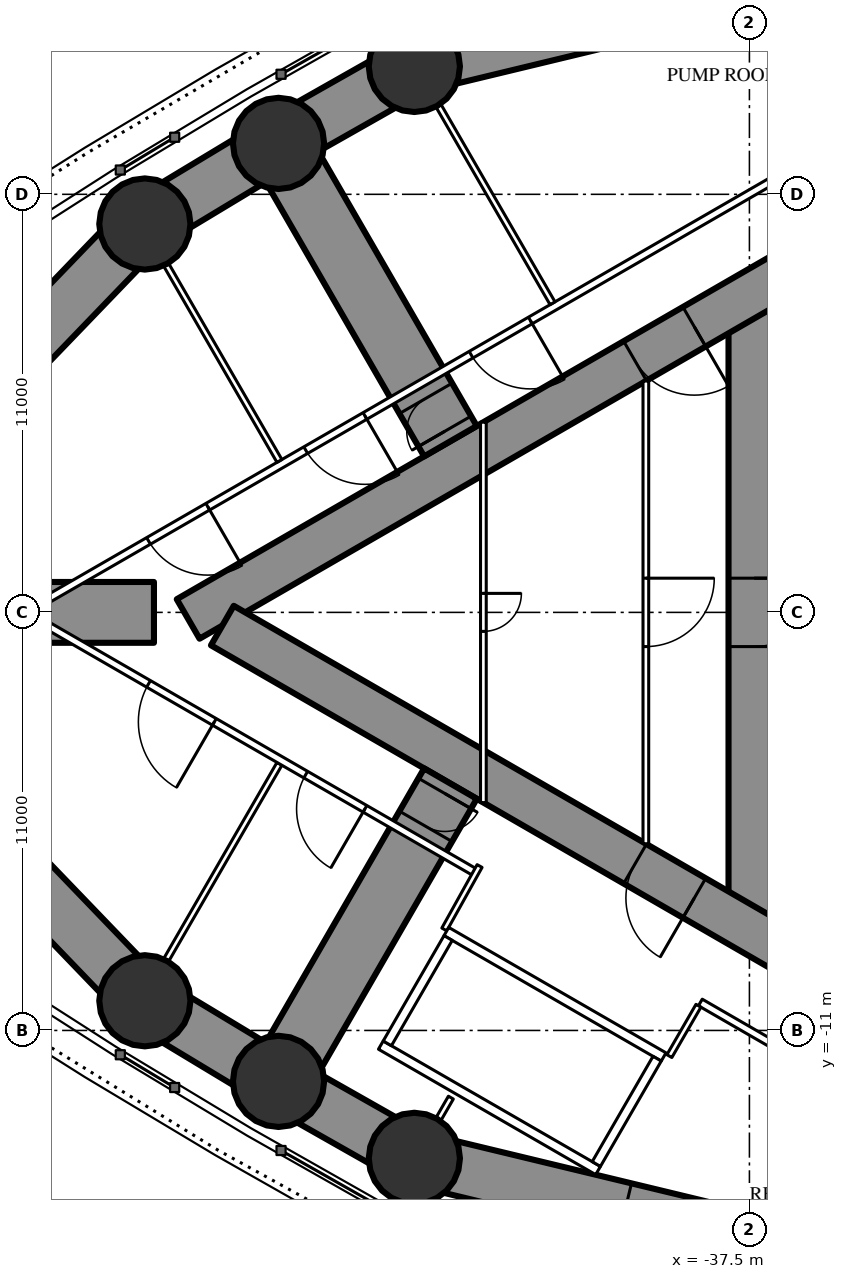
"""IFC4 building model, lengths in metres.
Left out: names, types, materials, properties, quantities, classifications, styles, units other than length and angle.
Written with IfcOpenShell. Run it as: python <this file> out.ifc"""

import sys

from ifc_helpers import new_model, si_unit, direction, frame, frame_2d, origin, origin_2d, place, context, subcontext, project, spatial, rectangle, circle, extrude, element, fill, save


model = new_model("IFC4")
c1 = context("Model", 3, precision=1e-05, world=origin(), true_north=direction((0.0, 1.0)))
c2 = subcontext(c1, "Body", "Model", "MODEL_VIEW")
j1 = project(units=[si_unit("LENGTHUNIT", "METRE"), si_unit("PLANEANGLEUNIT", "RADIAN")], contexts=[c1])
p1 = place(None, origin())
s1 = spatial("IfcSite", under=j1, at=p1, CompositionType="ELEMENT")
p2 = place(p1, origin())
s2 = spatial("IfcBuilding", under=s1, at=p2, CompositionType="ELEMENT")
p3 = place(p2, frame((0.0, 0.0, 210.3)))
s3 = spatial("IfcBuildingStorey", under=s2, at=p3, CompositionType="ELEMENT", Elevation=210.3)
for number, where, z_axis, x_axis in (
    (1, (-53.408, -10.219, 0.0), (0.0, 0.0, 1.0), (1.0, 0.0, 0.0)),
    (2, (-49.89, -12.34, 0.0), (0.0, 0.0, 1.0), (1.0, 0.0, 0.0)),
    (3, (-46.317, -14.365, 0.0), (0.0, 0.0, 1.0), (1.0, 0.0, 0.0)),
    (4, (-46.317, 14.365, 0.0), (0.0, 0.0, 1.0), (1.0, 0.0, 0.0)),
    (5, (-49.89, 12.34, 0.0), (0.0, 0.0, 1.0), (1.0, 0.0, 0.0)),
    (6, (-53.408, 10.219, 0.0), (0.0, 0.0, 1.0), (1.0, 0.0, 0.0)),
):
    element("IfcColumn", number, at=place(p3, frame(where, z_axis=z_axis, x_axis=x_axis)), inside=s3, PredefinedType="COLUMN", context=c2, shape_type="SweptSolid", body=[
        extrude(circle(Radius=1.2, at=origin_2d()), origin(), (0.0, 0.0, 1.0), 5.0),
    ])
p4 = place(p3, frame((-37.375, 8.6, 0.0), z_axis=(0.0, 0.0, 1.0), x_axis=(0.0, -1.0, 0.0)))
e7 = element("IfcWall", 7, at=p4, inside=s3, PredefinedType="SHEAR", context=c2, shape_type="SweptSolid", body=[
    extrude(rectangle(XDim=17.2, YDim=1.35, at=frame_2d((8.6, 0.0))), origin(), (0.0, 0.0, 1.0), 5.0),
])
p5 = place(p4, frame((7.7, 0.0, 0.0)))
e8 = element("IfcOpeningElement", 8, at=p5, cuts=e7, PredefinedType="OPENING", context=c2, shape_type="SweptSolid", body=[
    extrude(rectangle(XDim=1.8, YDim=2.2, at=frame_2d((0.9, 1.1))), frame((0.0, 0.685, 0.0), z_axis=(0.0, -1.0, 0.0), x_axis=(1.0, 0.0, 0.0)), (0.0, 0.0, 1.0), 1.37),
])
p6 = place(p3, frame((-27.2, 14.3, 0.0), z_axis=(0.0, 0.0, 1.0), x_axis=(-0.866026593062, -0.499997940104, 0.0)))
e9 = element("IfcWall", 9, at=p6, inside=s3, PredefinedType="SHEAR", context=c2, shape_type="SweptSolid", body=[
    extrude(rectangle(XDim=28.946, YDim=1.2, at=frame_2d((14.473, 0.0))), origin(), (0.0, 0.0, 1.0), 5.0),
])
p7 = place(p6, frame((6.5, 0.0, 0.0)))
e10 = element("IfcOpeningElement", 10, at=p7, cuts=e9, PredefinedType="OPENING", context=c2, shape_type="SweptSolid", body=[
    extrude(rectangle(XDim=1.0, YDim=2.2, at=frame_2d((0.5, 1.1))), frame((0.0, 0.61, 0.0), z_axis=(0.0, -1.0, 0.0), x_axis=(1.0, 0.0, 0.0)), (0.0, 0.0, 1.0), 1.22),
])
p8 = place(p6, frame((13.568, 0.0, 0.0)))
e11 = element("IfcOpeningElement", 11, at=p8, cuts=e9, PredefinedType="OPENING", context=c2, shape_type="SweptSolid", body=[
    extrude(rectangle(XDim=1.8, YDim=2.2, at=frame_2d((0.9, 1.1))), frame((0.0, 0.61, 0.0), z_axis=(0.0, -1.0, 0.0), x_axis=(1.0, 0.0, 0.0)), (0.0, 0.0, 1.0), 1.22),
])
p9 = place(p3, frame((-27.2, -14.3, 0.0), z_axis=(0.0, 0.0, 1.0), x_axis=(-0.866024021859, 0.500002393557, 0.0)))
e12 = element("IfcWall", 12, at=p9, inside=s3, PredefinedType="SHEAR", context=c2, shape_type="SweptSolid", body=[
    extrude(rectangle(XDim=27.907, YDim=1.2, at=frame_2d((13.954, 0.0))), origin(), (0.0, 0.0, 1.0), 5.0),
])
p10 = place(p9, frame((6.5, 0.0, 0.0)))
e13 = element("IfcOpeningElement", 13, at=p10, cuts=e12, PredefinedType="OPENING", context=c2, shape_type="SweptSolid", body=[
    extrude(rectangle(XDim=1.0, YDim=2.2, at=frame_2d((0.5, 1.1))), frame((0.0, 0.61, 0.0), z_axis=(0.0, -1.0, 0.0), x_axis=(1.0, 0.0, 0.0)), (0.0, 0.0, 1.0), 1.22),
])
p11 = place(p9, frame((13.568, 0.0, 0.0)))
e14 = element("IfcOpeningElement", 14, at=p11, cuts=e12, PredefinedType="OPENING", context=c2, shape_type="SweptSolid", body=[
    extrude(rectangle(XDim=1.8, YDim=2.2, at=frame_2d((0.9, 1.1))), frame((0.0, 0.61, 0.0), z_axis=(0.0, -1.0, 0.0), x_axis=(1.0, 0.0, 0.0)), (0.0, 0.0, 1.0), 1.22),
])
p12 = place(p3, frame((-45.366, 4.504, 0.0), z_axis=(0.0, 0.0, 1.0), x_axis=(-0.499998848701, 0.866026068486, 0.0)))
e15 = element("IfcWall", 15, at=p12, inside=s3, PredefinedType="SHEAR", context=c2, shape_type="SweptSolid", body=[
    extrude(rectangle(XDim=9.048, YDim=1.6, at=frame_2d((4.524, 0.0))), origin(), (0.0, 0.0, 1.0), 5.0),
])
p13 = place(p12, frame((0.3, 0.0, 0.0)))
e16 = element("IfcOpeningElement", 16, at=p13, cuts=e15, PredefinedType="OPENING", context=c2, shape_type="SweptSolid", body=[
    extrude(rectangle(XDim=1.0, YDim=2.2, at=frame_2d((0.5, 1.1))), frame((0.0, 0.81, 0.0), z_axis=(0.0, -1.0, 0.0), x_axis=(1.0, 0.0, 0.0)), (0.0, 0.0, 1.0), 1.62),
])
p14 = place(p3, frame((-53.168, 0.0, 0.0), z_axis=(0.0, 0.0, 1.0), x_axis=(-1.0, 0.0, 0.0)))
e17 = element("IfcWall", 17, at=p14, inside=s3, PredefinedType="SHEAR", context=c2, shape_type="SweptSolid", body=[
    extrude(rectangle(XDim=10.066, YDim=1.6, at=frame_2d((5.033, 0.0))), origin(), (0.0, 0.0, 1.0), 5.0),
])
p15 = place(p3, frame((-45.366, -4.504, 0.0), z_axis=(0.0, 0.0, 1.0), x_axis=(-0.499998848701, -0.866026068486, 0.0)))
e18 = element("IfcWall", 18, at=p15, inside=s3, PredefinedType="SHEAR", context=c2, shape_type="SweptSolid", body=[
    extrude(rectangle(XDim=9.048, YDim=1.6, at=frame_2d((4.524, 0.0))), origin(), (0.0, 0.0, 1.0), 5.0),
])
p16 = place(p15, frame((0.3, 0.0, 0.0)))
e19 = element("IfcOpeningElement", 19, at=p16, cuts=e18, PredefinedType="OPENING", context=c2, shape_type="SweptSolid", body=[
    extrude(rectangle(XDim=1.0, YDim=2.2, at=frame_2d((0.5, 1.1))), frame((0.0, 0.81, 0.0), z_axis=(0.0, -1.0, 0.0), x_axis=(1.0, 0.0, 0.0)), (0.0, 0.0, 1.0), 1.62),
])
p17 = place(p3, frame((-32.301, 17.745, 0.0), z_axis=(0.0, 0.0, 1.0), x_axis=(-0.972132796948, -0.234430853556, 0.0)))
e20 = element("IfcWall", 20, at=p17, inside=s3, PredefinedType="SHEAR", context=c2, shape_type="SweptSolid", body=[
    extrude(rectangle(XDim=14.417, YDim=1.4, at=frame_2d((7.209, 0.0))), origin(), (0.0, 0.0, 1.0), 5.0),
])
p18 = place(p17, frame((5.709, 0.0, 0.6)))
e21 = element("IfcOpeningElement", 21, at=p18, cuts=e20, PredefinedType="OPENING", context=c2, shape_type="SweptSolid", body=[
    extrude(rectangle(XDim=3.0, YDim=1.2, at=frame_2d((1.5, 0.6))), frame((0.0, 0.71, 0.0), z_axis=(0.0, -1.0, 0.0), x_axis=(1.0, 0.0, 0.0)), (0.0, 0.0, 1.0), 1.42),
])
for number, where, z_axis, x_axis in (
    (22, (-46.317, 14.365, 0.0), (0.0, 0.0, 1.0), (-0.87, -0.493, 0.0)),
    (23, (-49.89, 12.34, 0.0), (0.0, 0.0, 1.0), (-0.856, -0.516, 0.0)),
):
    element("IfcWall", number, at=place(p3, frame(where, z_axis=z_axis, x_axis=x_axis)), inside=s3, PredefinedType="SHEAR", context=c2, shape_type="SweptSolid", body=[
        extrude(rectangle(XDim=4.108, YDim=1.4, at=frame_2d((2.054, 0.0))), origin(), (0.0, 0.0, 1.0), 5.0),
    ])
p19 = place(p3, frame((-53.408, 10.219, 0.0), z_axis=(0.0, 0.0, 1.0), x_axis=(-0.693134527053, -0.720808245934, 0.0)))
e24 = element("IfcWall", 24, at=p19, inside=s3, PredefinedType="SHEAR", context=c2, shape_type="SweptSolid", body=[
    extrude(rectangle(XDim=14.177, YDim=1.4, at=frame_2d((7.089, 0.0))), origin(), (0.0, 0.0, 1.0), 5.0),
])
p20 = place(p19, frame((5.589, 0.0, 0.6)))
e25 = element("IfcOpeningElement", 25, at=p20, cuts=e24, PredefinedType="OPENING", context=c2, shape_type="SweptSolid", body=[
    extrude(rectangle(XDim=3.0, YDim=1.2, at=frame_2d((1.5, 0.6))), frame((0.0, 0.71, 0.0), z_axis=(0.0, -1.0, 0.0), x_axis=(1.0, 0.0, 0.0)), (0.0, 0.0, 1.0), 1.42),
])
p21 = place(p3, frame((-63.234, 0.0, 0.0), z_axis=(0.0, 0.0, 1.0), x_axis=(0.693134527053, -0.720808245934, 0.0)))
e26 = element("IfcWall", 26, at=p21, inside=s3, PredefinedType="SHEAR", context=c2, shape_type="SweptSolid", body=[
    extrude(rectangle(XDim=14.177, YDim=1.4, at=frame_2d((7.089, 0.0))), origin(), (0.0, 0.0, 1.0), 5.0),
])
p22 = place(p21, frame((5.589, 0.0, 0.6)))
e27 = element("IfcOpeningElement", 27, at=p22, cuts=e26, PredefinedType="OPENING", context=c2, shape_type="SweptSolid", body=[
    extrude(rectangle(XDim=3.0, YDim=1.2, at=frame_2d((1.5, 0.6))), frame((0.0, 0.71, 0.0), z_axis=(0.0, -1.0, 0.0), x_axis=(1.0, 0.0, 0.0)), (0.0, 0.0, 1.0), 1.42),
])
for number, where, z_axis, x_axis in (
    (28, (-53.408, -10.219, 0.0), (0.0, 0.0, 1.0), (0.856, -0.516, 0.0)),
    (29, (-49.89, -12.34, 0.0), (0.0, 0.0, 1.0), (0.87, -0.493, 0.0)),
):
    element("IfcWall", number, at=place(p3, frame(where, z_axis=z_axis, x_axis=x_axis)), inside=s3, PredefinedType="SHEAR", context=c2, shape_type="SweptSolid", body=[
        extrude(rectangle(XDim=4.108, YDim=1.4, at=frame_2d((2.054, 0.0))), origin(), (0.0, 0.0, 1.0), 5.0),
    ])
p23 = place(p3, frame((-46.317, -14.365, 0.0), z_axis=(0.0, 0.0, 1.0), x_axis=(0.972132796948, -0.234430853556, 0.0)))
e30 = element("IfcWall", 30, at=p23, inside=s3, PredefinedType="SHEAR", context=c2, shape_type="SweptSolid", body=[
    extrude(rectangle(XDim=14.417, YDim=1.4, at=frame_2d((7.209, 0.0))), origin(), (0.0, 0.0, 1.0), 5.0),
])
p24 = place(p23, frame((5.709, 0.0, 0.6)))
e31 = element("IfcOpeningElement", 31, at=p24, cuts=e30, PredefinedType="OPENING", context=c2, shape_type="SweptSolid", body=[
    extrude(rectangle(XDim=3.0, YDim=1.2, at=frame_2d((1.5, 0.6))), frame((0.0, 0.71, 0.0), z_axis=(0.0, -1.0, 0.0), x_axis=(1.0, 0.0, 0.0)), (0.0, 0.0, 1.0), 1.42),
])
p25 = place(p3, frame((-28.737, 16.068, 0.0), z_axis=(0.0, 0.0, 1.0), x_axis=(-0.866026057212, -0.499998868229, 0.0)))
e32 = element("IfcWall", 32, at=p25, inside=s3, PredefinedType="PARTITIONING", context=c2, shape_type="SweptSolid", body=[
    extrude(rectangle(XDim=32.137, YDim=0.2, at=frame_2d((16.068, 0.0))), origin(), (0.0, 0.0, 1.0), 4.75),
])
p26 = place(p25, frame((7.134, 0.0, 0.0)))
e33 = element("IfcOpeningElement", 33, at=p26, cuts=e32, PredefinedType="OPENING", context=c2, shape_type="SweptSolid", body=[
    extrude(rectangle(XDim=2.0, YDim=2.4, at=frame_2d((1.0, 1.2))), frame((0.0, 0.11, 0.0), z_axis=(0.0, -1.0, 0.0), x_axis=(1.0, 0.0, 0.0)), (0.0, 0.0, 1.0), 0.22),
])
p27 = place(p25, frame((16.776, 0.0, 0.0)))
e34 = element("IfcOpeningElement", 34, at=p27, cuts=e32, PredefinedType="OPENING", context=c2, shape_type="SweptSolid", body=[
    extrude(rectangle(XDim=1.8, YDim=2.2, at=frame_2d((0.9, 1.1))), frame((0.0, 0.11, 0.0), z_axis=(0.0, -1.0, 0.0), x_axis=(1.0, 0.0, 0.0)), (0.0, 0.0, 1.0), 0.22),
])
p28 = place(p25, frame((21.799, 0.0, 0.0)))
e35 = element("IfcOpeningElement", 35, at=p28, cuts=e32, PredefinedType="OPENING", context=c2, shape_type="SweptSolid", body=[
    extrude(rectangle(XDim=1.8, YDim=2.2, at=frame_2d((0.9, 1.1))), frame((0.0, 0.11, 0.0), z_axis=(0.0, -1.0, 0.0), x_axis=(1.0, 0.0, 0.0)), (0.0, 0.0, 1.0), 0.22),
])
p29 = place(p25, frame((26.575, 0.0, 0.0)))
e36 = element("IfcOpeningElement", 36, at=p29, cuts=e32, PredefinedType="OPENING", context=c2, shape_type="SweptSolid", body=[
    extrude(rectangle(XDim=1.8, YDim=2.2, at=frame_2d((0.9, 1.1))), frame((0.0, 0.11, 0.0), z_axis=(0.0, -1.0, 0.0), x_axis=(1.0, 0.0, 0.0)), (0.0, 0.0, 1.0), 0.22),
])
p30 = place(p3, frame((-42.68, 8.134, 0.0), z_axis=(0.0, 0.0, 1.0), x_axis=(-0.499984479505, 0.866034364361, 0.0)))
e37 = element("IfcWall", 37, at=p30, inside=s3, PredefinedType="PARTITIONING", context=c2, shape_type="SweptSolid", body=[
    extrude(rectangle(XDim=5.995, YDim=0.15, at=frame_2d((2.998, 0.0))), origin(), (0.0, 0.0, 1.0), 3.85),
])
for number, where, z_axis, x_axis in (
    (38, (-49.866, 3.985, 0.0), (0.0, 0.0, 1.0), (-0.5, 0.866, 0.0)),
    (39, (-49.866, -3.985, 0.0), (0.0, 0.0, 1.0), (-0.5, -0.866, 0.0)),
):
    element("IfcWall", number, at=place(p3, frame(where, z_axis=z_axis, x_axis=x_axis)), inside=s3, PredefinedType="PARTITIONING", context=c2, shape_type="SweptSolid", body=[
        extrude(rectangle(XDim=5.95, YDim=0.15, at=frame_2d((2.975, 0.0))), origin(), (0.0, 0.0, 1.0), 3.85),
    ])
p31 = place(p3, frame((-45.356, -12.767, 0.0), z_axis=(0.0, 0.0, 1.0), x_axis=(-0.499886366516, -0.866091000168, 0.0)))
e40 = element("IfcWall", 40, at=p31, inside=s3, PredefinedType="PARTITIONING", context=c2, shape_type="SweptSolid", body=[
    extrude(rectangle(XDim=0.645, YDim=0.15, at=frame_2d((0.322, 0.0))), origin(), (0.0, 0.0, 1.0), 4.75),
])
p32 = place(p3, frame((-28.737, -16.068, 0.0), z_axis=(0.0, 0.0, 1.0), x_axis=(-0.866029399323, 0.49999307946, 0.0)))
e41 = element("IfcWall", 41, at=p32, inside=s3, PredefinedType="PARTITIONING", context=c2, shape_type="SweptSolid", body=[
    extrude(rectangle(XDim=11.61, YDim=0.2, at=frame_2d((5.805, 0.0))), origin(), (0.0, 0.0, 1.0), 4.75),
])
p33 = place(p32, frame((4.905, 0.0, 0.0)))
e42 = element("IfcOpeningElement", 42, at=p33, cuts=e41, PredefinedType="OPENING", context=c2, shape_type="SweptSolid", body=[
    extrude(rectangle(XDim=1.8, YDim=2.2, at=frame_2d((0.9, 1.1))), frame((0.0, 0.11, 0.0), z_axis=(0.0, -1.0, 0.0), x_axis=(1.0, 0.0, 0.0)), (0.0, 0.0, 1.0), 0.22),
])
p34 = place(p3, frame((-44.715, -6.844, 0.0), z_axis=(0.0, 0.0, 1.0), x_axis=(-0.866025261224, 0.500000246922, 0.0)))
e43 = element("IfcWall", 43, at=p34, inside=s3, PredefinedType="PARTITIONING", context=c2, shape_type="SweptSolid", body=[
    extrude(rectangle(XDim=13.567, YDim=0.2, at=frame_2d((6.783, 0.0))), origin(), (0.0, 0.0, 1.0), 4.75),
])
p35 = place(p34, frame((7.925, 0.0, 0.0)))
e44 = element("IfcOpeningElement", 44, at=p35, cuts=e43, PredefinedType="OPENING", context=c2, shape_type="SweptSolid", body=[
    extrude(rectangle(XDim=2.0, YDim=2.4, at=frame_2d((1.0, 1.2))), frame((0.0, 0.11, 0.0), z_axis=(0.0, -1.0, 0.0), x_axis=(1.0, 0.0, 0.0)), (0.0, 0.0, 1.0), 0.22),
])
p36 = place(p34, frame((3.349, 0.0, 0.0)))
e45 = element("IfcOpeningElement", 45, at=p36, cuts=e43, PredefinedType="OPENING", context=c2, shape_type="SweptSolid", body=[
    extrude(rectangle(XDim=1.8, YDim=2.2, at=frame_2d((0.9, 1.1))), frame((0.0, 0.11, 0.0), z_axis=(0.0, -1.0, 0.0), x_axis=(1.0, 0.0, 0.0)), (0.0, 0.0, 1.0), 0.22),
])
p37 = place(p3, frame((-44.6, -6.673, 0.0), z_axis=(0.0, 0.0, 1.0), x_axis=(-0.486293872994, -0.873795324483, 0.0)))
e46 = element("IfcWall", 46, at=p37, inside=s3, PredefinedType="PARTITIONING", context=c2, shape_type="SweptSolid", body=[
    extrude(rectangle(XDim=1.91, YDim=0.15, at=frame_2d((0.955, 0.0))), origin(), (0.0, 0.0, 1.0), 4.75),
])
p38 = place(p3, frame((-38.841, -10.35, 0.0), z_axis=(0.0, 0.0, 1.0), x_axis=(-0.499966498333, -0.866044745117, 0.0)))
e47 = element("IfcWall", 47, at=p38, inside=s3, PredefinedType="PARTITIONING", context=c2, shape_type="SweptSolid", body=[
    extrude(rectangle(XDim=1.53, YDim=0.15, at=frame_2d((0.765, 0.0))), origin(), (0.0, 0.0, 1.0), 4.75),
])
p39 = place(p3, frame((-40.225, 6.087, 0.0), z_axis=(0.0, 0.0, 1.0), x_axis=(0.0, -1.0, 0.0)))
e48 = element("IfcWall", 48, at=p39, inside=s3, PredefinedType="PARTITIONING", context=c2, shape_type="SweptSolid", body=[
    extrude(rectangle(XDim=12.174, YDim=0.15, at=frame_2d((6.087, 0.0))), origin(), (0.0, 0.0, 1.0), 4.75),
])
p40 = place(p39, frame((5.187, 0.0, 0.0)))
e49 = element("IfcOpeningElement", 49, at=p40, cuts=e48, PredefinedType="OPENING", context=c2, shape_type="SweptSolid", body=[
    extrude(rectangle(XDim=1.8, YDim=2.2, at=frame_2d((0.9, 1.1))), frame((0.0, 0.085, 0.0), z_axis=(0.0, -1.0, 0.0), x_axis=(1.0, 0.0, 0.0)), (0.0, 0.0, 1.0), 0.17),
])
p41 = place(p3, frame((-44.5, 5.005, 0.0), z_axis=(0.0, 0.0, 1.0), x_axis=(0.0, -1.0, 0.0)))
e50 = element("IfcWall", 50, at=p41, inside=s3, PredefinedType="PARTITIONING", context=c2, shape_type="SweptSolid", body=[
    extrude(rectangle(XDim=10.009, YDim=0.15, at=frame_2d((5.005, 0.0))), origin(), (0.0, 0.0, 1.0), 4.75),
])
p42 = place(p41, frame((4.505, 0.0, 0.0)))
e51 = element("IfcOpeningElement", 51, at=p42, cuts=e50, PredefinedType="OPENING", context=c2, shape_type="SweptSolid", body=[
    extrude(rectangle(XDim=1.0, YDim=2.2, at=frame_2d((0.5, 1.1))), frame((0.0, 0.085, 0.0), z_axis=(0.0, -1.0, 0.0), x_axis=(1.0, 0.0, 0.0)), (0.0, 0.0, 1.0), 0.17),
])
p43 = place(p3, frame((-39.758, -11.697, 0.0), z_axis=(0.0, 0.0, 1.0), x_axis=(-0.866024194504, 0.500002094529, 0.0)))
e52 = element("IfcWall", 52, at=p43, inside=s3, PredefinedType="PARTITIONING", context=c2, shape_type="SweptSolid", body=[
    extrude(rectangle(XDim=6.6, YDim=0.25, at=frame_2d((3.3, 0.0))), origin(), (0.0, 0.0, 1.0), 4.75),
])
p44 = place(p3, frame((-41.482, -14.686, 0.0), z_axis=(0.0, 0.0, 1.0), x_axis=(-0.86603344179, 0.499986077507, 0.0)))
e53 = element("IfcWall", 53, at=p44, inside=s3, PredefinedType="PARTITIONING", context=c2, shape_type="SweptSolid", body=[
    extrude(rectangle(XDim=6.6, YDim=0.25, at=frame_2d((3.3, 0.0))), origin(), (0.0, 0.0, 1.0), 4.75),
])
for number, where, z_axis, x_axis in (
    (54, (-39.928, -11.743, 0.0), (0.0, 0.0, 1.0), (-0.5, -0.866, 0.0)),
    (55, (-45.428, -8.568, 0.0), (0.0, 0.0, 1.0), (-0.5, -0.866, 0.0)),
):
    element("IfcWall", number, at=place(p3, frame(where, z_axis=z_axis, x_axis=x_axis)), inside=s3, PredefinedType="PARTITIONING", context=c2, shape_type="SweptSolid", body=[
        extrude(rectangle(XDim=3.201, YDim=0.25, at=frame_2d((1.6, 0.0))), origin(), (0.0, 0.0, 1.0), 4.75),
    ])
p45 = place(p13, origin())
e56 = element("IfcDoor", 56, at=p45, inside=s3, OperationType="SINGLE_SWING_LEFT", PredefinedType="DOOR", context=c2, shape_type="SweptSolid", body=[
    extrude(rectangle(XDim=1.0, YDim=2.2, at=frame_2d((0.5, 1.1))), frame((0.0, 0.025, 0.0), z_axis=(0.0, -1.0, 0.0), x_axis=(1.0, 0.0, 0.0)), (0.0, 0.0, 1.0), 0.05),
])
fill(e16, e56)
p46 = place(p16, origin())
e57 = element("IfcDoor", 57, at=p46, inside=s3, OperationType="SINGLE_SWING_LEFT", PredefinedType="DOOR", context=c2, shape_type="SweptSolid", body=[
    extrude(rectangle(XDim=1.0, YDim=2.2, at=frame_2d((0.5, 1.1))), frame((0.0, 0.025, 0.0), z_axis=(0.0, -1.0, 0.0), x_axis=(1.0, 0.0, 0.0)), (0.0, 0.0, 1.0), 0.05),
])
fill(e19, e57)
p47 = place(p27, origin())
e58 = element("IfcDoor", 58, at=p47, inside=s3, OperationType="DOUBLE_DOOR_SINGLE_SWING", PredefinedType="DOOR", context=c2, shape_type="SweptSolid", body=[
    extrude(rectangle(XDim=1.8, YDim=2.2, at=frame_2d((0.9, 1.1))), frame((0.0, 0.025, 0.0), z_axis=(0.0, -1.0, 0.0), x_axis=(1.0, 0.0, 0.0)), (0.0, 0.0, 1.0), 0.05),
])
fill(e34, e58)
p48 = place(p28, origin())
e59 = element("IfcDoor", 59, at=p48, inside=s3, OperationType="DOUBLE_DOOR_SINGLE_SWING", PredefinedType="DOOR", context=c2, shape_type="SweptSolid", body=[
    extrude(rectangle(XDim=1.8, YDim=2.2, at=frame_2d((0.9, 1.1))), frame((0.0, 0.025, 0.0), z_axis=(0.0, -1.0, 0.0), x_axis=(1.0, 0.0, 0.0)), (0.0, 0.0, 1.0), 0.05),
])
fill(e35, e59)
p49 = place(p29, origin())
e60 = element("IfcDoor", 60, at=p49, inside=s3, OperationType="DOUBLE_DOOR_SINGLE_SWING", PredefinedType="DOOR", context=c2, shape_type="SweptSolid", body=[
    extrude(rectangle(XDim=1.8, YDim=2.2, at=frame_2d((0.9, 1.1))), frame((0.0, 0.025, 0.0), z_axis=(0.0, -1.0, 0.0), x_axis=(1.0, 0.0, 0.0)), (0.0, 0.0, 1.0), 0.05),
])
fill(e36, e60)
p50 = place(p35, origin())
e61 = element("IfcDoor", 61, at=p50, inside=s3, OperationType="DOUBLE_DOOR_SINGLE_SWING", PredefinedType="DOOR", context=c2, shape_type="SweptSolid", body=[
    extrude(rectangle(XDim=2.0, YDim=2.4, at=frame_2d((1.0, 1.2))), frame((0.0, 0.025, 0.0), z_axis=(0.0, -1.0, 0.0), x_axis=(1.0, 0.0, 0.0)), (0.0, 0.0, 1.0), 0.05),
])
fill(e44, e61)
p51 = place(p36, origin())
e62 = element("IfcDoor", 62, at=p51, inside=s3, OperationType="DOUBLE_DOOR_SINGLE_SWING", PredefinedType="DOOR", context=c2, shape_type="SweptSolid", body=[
    extrude(rectangle(XDim=1.8, YDim=2.2, at=frame_2d((0.9, 1.1))), frame((0.0, 0.025, 0.0), z_axis=(0.0, -1.0, 0.0), x_axis=(1.0, 0.0, 0.0)), (0.0, 0.0, 1.0), 0.05),
])
fill(e45, e62)
p52 = place(p40, origin())
e63 = element("IfcDoor", 63, at=p52, inside=s3, OperationType="DOUBLE_DOOR_SINGLE_SWING", PredefinedType="DOOR", context=c2, shape_type="SweptSolid", body=[
    extrude(rectangle(XDim=1.8, YDim=2.2, at=frame_2d((0.9, 1.1))), frame((0.0, 0.025, 0.0), z_axis=(0.0, -1.0, 0.0), x_axis=(1.0, 0.0, 0.0)), (0.0, 0.0, 1.0), 0.05),
])
fill(e49, e63)
p53 = place(p42, origin())
e64 = element("IfcDoor", 64, at=p53, inside=s3, OperationType="SINGLE_SWING_LEFT", PredefinedType="DOOR", context=c2, shape_type="SweptSolid", body=[
    extrude(rectangle(XDim=1.0, YDim=2.2, at=frame_2d((0.5, 1.1))), frame((0.0, 0.025, 0.0), z_axis=(0.0, -1.0, 0.0), x_axis=(1.0, 0.0, 0.0)), (0.0, 0.0, 1.0), 0.05),
])
fill(e51, e64)
p54 = place(p8, origin())
e65 = element("IfcDoor", 65, at=p54, inside=s3, OperationType="DOUBLE_DOOR_SINGLE_SWING", PredefinedType="DOOR", context=c2, shape_type="SweptSolid", body=[
    extrude(rectangle(XDim=1.8, YDim=2.2, at=frame_2d((0.9, 1.1))), frame((0.0, 0.025, 0.0), z_axis=(0.0, -1.0, 0.0), x_axis=(1.0, 0.0, 0.0)), (0.0, 0.0, 1.0), 0.05),
])
fill(e11, e65)
p55 = place(p11, origin())
e66 = element("IfcDoor", 66, at=p55, inside=s3, OperationType="DOUBLE_DOOR_SINGLE_SWING", PredefinedType="DOOR", context=c2, shape_type="SweptSolid", body=[
    extrude(rectangle(XDim=1.8, YDim=2.2, at=frame_2d((0.9, 1.1))), frame((0.0, 0.025, 0.0), z_axis=(0.0, -1.0, 0.0), x_axis=(1.0, 0.0, 0.0)), (0.0, 0.0, 1.0), 0.05),
])
fill(e14, e66)
p56 = place(p5, origin())
e67 = element("IfcDoor", 67, at=p56, inside=s3, OperationType="DOUBLE_DOOR_SINGLE_SWING", PredefinedType="DOOR", context=c2, shape_type="SweptSolid", body=[
    extrude(rectangle(XDim=1.8, YDim=2.2, at=frame_2d((0.9, 1.1))), frame((0.0, 0.025, 0.0), z_axis=(0.0, -1.0, 0.0), x_axis=(1.0, 0.0, 0.0)), (0.0, 0.0, 1.0), 0.05),
])
fill(e8, e67)
save(model, sys.argv[1])
